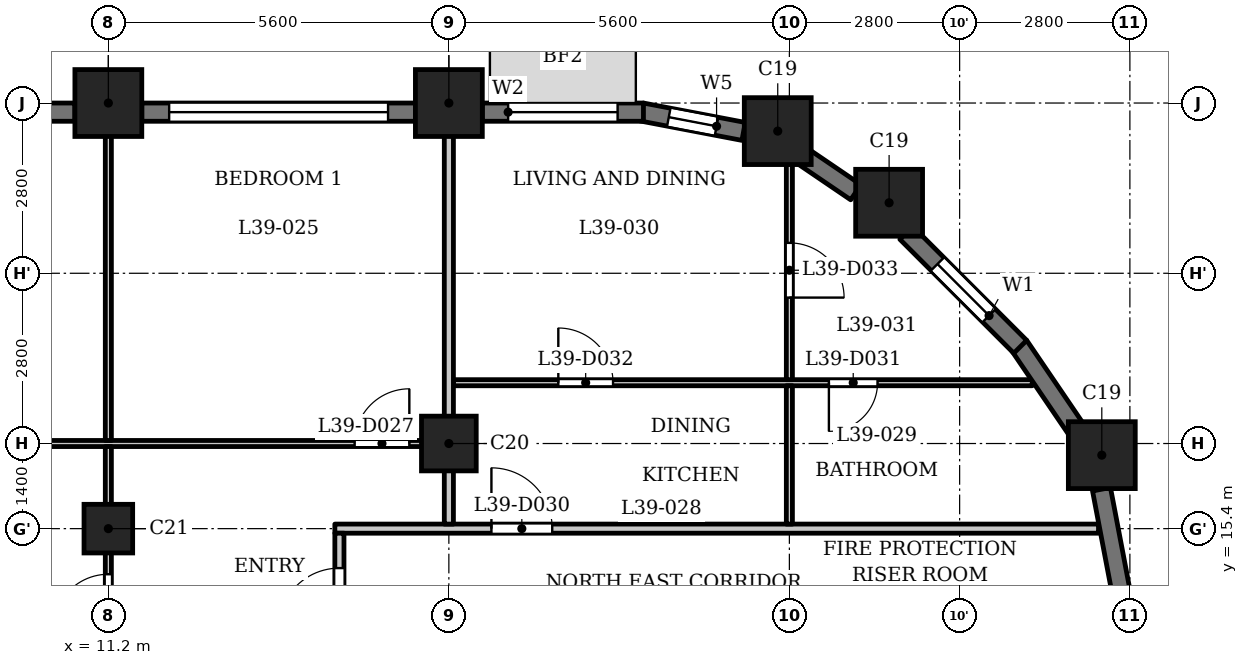
"""IFC4 building model, lengths in metres.
Left out: names, types, materials, properties, quantities, classifications, styles, units other than length and angle.
Written with IfcOpenShell. Run it as: python <this file> out.ifc"""

import sys

from ifc_helpers import new_model, si_unit, direction, frame, frame_2d, origin, origin_2d, place, context, subcontext, project, spatial, rectangle, extrude, element, fill, save


model = new_model("IFC4")
c1 = context("Model", 3, precision=1e-05, world=origin(), true_north=direction((0.0, 1.0)))
c2 = subcontext(c1, "Body", "Model", "MODEL_VIEW")
j1 = project(units=[si_unit("LENGTHUNIT", "METRE"), si_unit("PLANEANGLEUNIT", "RADIAN")], contexts=[c1])
p1 = place(None, origin())
s1 = spatial("IfcSite", under=j1, at=p1, CompositionType="ELEMENT")
p2 = place(p1, origin())
s2 = spatial("IfcBuilding", under=s1, at=p2, CompositionType="ELEMENT")
p3 = place(p2, frame((0.0, 0.0, 153.6)))
s3 = spatial("IfcBuildingStorey", under=s2, at=p3, CompositionType="ELEMENT", Elevation=153.6)
for number, where, z_axis, x_axis in (
    (1, (27.538, 16.609, 0.0), (0.0, 0.0, 1.0), (1.0, 0.0, 0.0)),
    (2, (24.04, 20.76, 0.0), (0.0, 0.0, 1.0), (1.0, 0.0, 0.0)),
    (3, (22.209, 21.938, 0.0), (0.0, 0.0, 1.0), (1.0, 0.0, 0.0)),
    (4, (16.8, 22.4, 0.0), (0.0, 0.0, 1.0), (1.0, 0.0, 0.0)),
    (5, (11.2, 22.4, 0.0), (0.0, 0.0, 1.0), (1.0, 0.0, 0.0)),
):
    element("IfcColumn", number, at=place(p3, frame(where, z_axis=z_axis, x_axis=x_axis)), inside=s3, PredefinedType="COLUMN", context=c2, shape_type="SweptSolid", body=[
        extrude(rectangle(XDim=1.1, YDim=1.1, at=origin_2d()), origin(), (0.0, 0.0, 1.0), 3.5),
    ])
p4 = place(p3, frame((16.8, 16.8, 0.0), z_axis=(0.0, 0.0, 1.0), x_axis=(1.0, 0.0, 0.0)))
e6 = element("IfcColumn", 6, at=p4, inside=s3, PredefinedType="COLUMN", context=c2, shape_type="SweptSolid", body=[
    extrude(rectangle(XDim=0.9, YDim=0.9, at=origin_2d()), origin(), (0.0, 0.0, 1.0), 3.5),
])
p5 = place(p3, frame((11.2, 15.4, 0.0), z_axis=(0.0, 0.0, 1.0), x_axis=(1.0, 0.0, 0.0)))
e7 = element("IfcColumn", 7, at=p5, inside=s3, PredefinedType="COLUMN", context=c2, shape_type="SweptSolid", body=[
    extrude(rectangle(XDim=0.8, YDim=0.8, at=origin_2d()), origin(), (0.0, 0.0, 1.0), 3.5),
])
p6 = place(p3, frame((27.853, 14.372, 0.0), z_axis=(0.0, 0.0, 1.0), x_axis=(-0.187302784601, 0.982302227871, 0.0)))
e8 = element("IfcWall", 8, at=p6, inside=s3, PredefinedType="SOLIDWALL", context=c2, shape_type="SweptSolid", body=[
    extrude(rectangle(XDim=1.706, YDim=0.3, at=frame_2d((0.853, 0.0))), origin(), (0.0, 0.0, 1.0), 2.45),
])
p7 = place(p3, frame((27.138, 17.002, 0.0), z_axis=(0.0, 0.0, 1.0), x_axis=(-0.562075160946, 0.827086158419, 0.0)))
e9 = element("IfcWall", 9, at=p7, inside=s3, PredefinedType="SOLIDWALL", context=c2, shape_type="SweptSolid", body=[
    extrude(rectangle(XDim=1.706, YDim=0.3, at=frame_2d((0.853, 0.0))), origin(), (0.0, 0.0, 1.0), 2.45),
])
p8 = place(p3, frame((26.197, 18.391, 0.0), z_axis=(0.0, 0.0, 1.0), x_axis=(-0.707060717099, 0.707152842274, 0.0)))
e10 = element("IfcWall", 10, at=p8, inside=s3, PredefinedType="SOLIDWALL", context=c2, shape_type="SweptSolid", body=[
    extrude(rectangle(XDim=2.65, YDim=0.3, at=frame_2d((1.325, 0.0))), origin(), (0.0, 0.0, 1.0), 2.45),
])
p9 = place(p8, frame((0.725, 0.0, 0.6)))
e11 = element("IfcOpeningElement", 11, at=p9, cuts=e10, PredefinedType="OPENING", context=c2, shape_type="SweptSolid", body=[
    extrude(rectangle(XDim=1.2, YDim=1.55, at=frame_2d((0.6, 0.775))), frame((0.0, 0.16, 0.0), z_axis=(0.0, -1.0, 0.0), x_axis=(1.0, 0.0, 0.0)), (0.0, 0.0, 1.0), 0.32),
])
p10 = place(p3, frame((23.492, 20.932, 0.0), z_axis=(0.0, 0.0, 1.0), x_axis=(-0.826993959827, 0.562210806023, 0.0)))
e12 = element("IfcWall", 12, at=p10, inside=s3, PredefinedType="SOLIDWALL", context=c2, shape_type="SweptSolid", body=[
    extrude(rectangle(XDim=1.077, YDim=0.3, at=frame_2d((0.539, 0.0))), origin(), (0.0, 0.0, 1.0), 3.2),
])
p11 = place(p3, frame((21.648, 21.933, 0.0), z_axis=(0.0, 0.0, 1.0), x_axis=(-0.982297206936, 0.187329114784, 0.0)))
e13 = element("IfcWall", 13, at=p11, inside=s3, PredefinedType="SOLIDWALL", context=c2, shape_type="SweptSolid", body=[
    extrude(rectangle(XDim=1.706, YDim=0.3, at=frame_2d((0.853, 0.0))), origin(), (0.0, 0.0, 1.0), 2.45),
])
p12 = place(p11, frame((0.453, 0.0, 0.6)))
e14 = element("IfcOpeningElement", 14, at=p12, cuts=e13, PredefinedType="OPENING", context=c2, shape_type="SweptSolid", body=[
    extrude(rectangle(XDim=0.8, YDim=1.55, at=frame_2d((0.4, 0.775))), frame((0.0, 0.16, 0.0), z_axis=(0.0, -1.0, 0.0), x_axis=(1.0, 0.0, 0.0)), (0.0, 0.0, 1.0), 0.32),
])
p13 = place(p3, frame((20.0, 22.25, 0.0), z_axis=(0.0, 0.0, 1.0), x_axis=(-1.0, 0.0, 0.0)))
e15 = element("IfcWall", 15, at=p13, inside=s3, PredefinedType="SOLIDWALL", context=c2, shape_type="SweptSolid", body=[
    extrude(rectangle(XDim=2.65, YDim=0.3, at=frame_2d((1.325, 0.0))), origin(), (0.0, 0.0, 1.0), 2.45),
])
p14 = place(p13, frame((0.425, 0.0, 0.9)))
e16 = element("IfcOpeningElement", 16, at=p14, cuts=e15, PredefinedType="OPENING", context=c2, shape_type="SweptSolid", body=[
    extrude(rectangle(XDim=1.8, YDim=1.25, at=frame_2d((0.9, 0.625))), frame((0.0, 0.16, 0.0), z_axis=(0.0, -1.0, 0.0), x_axis=(1.0, 0.0, 0.0)), (0.0, 0.0, 1.0), 0.32),
])
p15 = place(p3, frame((16.25, 22.25, 0.0), z_axis=(0.0, 0.0, 1.0), x_axis=(-1.0, 0.0, 0.0)))
e17 = element("IfcWall", 17, at=p15, inside=s3, PredefinedType="SOLIDWALL", context=c2, shape_type="SweptSolid", body=[
    extrude(rectangle(XDim=4.5, YDim=0.3, at=frame_2d((2.25, 0.0))), origin(), (0.0, 0.0, 1.0), 2.45),
])
p16 = place(p15, frame((0.45, 0.0, 1.2)))
e18 = element("IfcOpeningElement", 18, at=p16, cuts=e17, PredefinedType="OPENING", context=c2, shape_type="SweptSolid", body=[
    extrude(rectangle(XDim=3.6, YDim=0.95, at=frame_2d((1.8, 0.475))), frame((0.0, 0.16, 0.0), z_axis=(0.0, -1.0, 0.0), x_axis=(1.0, 0.0, 0.0)), (0.0, 0.0, 1.0), 0.32),
])
p17 = place(p3, frame((10.65, 22.25, 0.0), z_axis=(0.0, 0.0, 1.0), x_axis=(-1.0, 0.0, 0.0)))
e19 = element("IfcWall", 19, at=p17, inside=s3, PredefinedType="SOLIDWALL", context=c2, shape_type="SweptSolid", body=[
    extrude(rectangle(XDim=4.5, YDim=0.3, at=frame_2d((2.25, 0.0))), origin(), (0.0, 0.0, 1.0), 2.45),
])
p18 = place(p17, frame((0.45, 0.0, 1.2)))
e20 = element("IfcOpeningElement", 20, at=p18, cuts=e19, PredefinedType="OPENING", context=c2, shape_type="SweptSolid", body=[
    extrude(rectangle(XDim=3.6, YDim=0.95, at=frame_2d((1.8, 0.475))), frame((0.0, 0.16, 0.0), z_axis=(0.0, -1.0, 0.0), x_axis=(1.0, 0.0, 0.0)), (0.0, 0.0, 1.0), 0.32),
])
p19 = place(p3, frame((14.925, 15.4, 0.0), z_axis=(0.0, 0.0, 1.0), x_axis=(1.0, 0.0, 0.0)))
e21 = element("IfcWall", 21, at=p19, inside=s3, PredefinedType="PARTITIONING", context=c2, shape_type="SweptSolid", body=[
    extrude(rectangle(XDim=12.559, YDim=0.15, at=frame_2d((6.279, 0.0))), origin(), (0.0, 0.0, 1.0), 3.2),
])
p20 = place(p19, frame((2.575, 0.0, 0.0)))
e22 = element("IfcOpeningElement", 22, at=p20, cuts=e21, PredefinedType="OPENING", context=c2, shape_type="SweptSolid", body=[
    extrude(rectangle(XDim=1.0, YDim=2.1, at=frame_2d((0.5, 1.05))), frame((0.0, 0.085, 0.0), z_axis=(0.0, -1.0, 0.0), x_axis=(1.0, 0.0, 0.0)), (0.0, 0.0, 1.0), 0.17),
])
p21 = place(p3, frame((-16.725, 16.8, 0.0), z_axis=(0.0, 0.0, 1.0), x_axis=(1.0, 0.0, 0.0)))
e23 = element("IfcWall", 23, at=p21, inside=s3, PredefinedType="PARTITIONING", context=c2, shape_type="SweptSolid", body=[
    extrude(rectangle(XDim=33.45, YDim=0.1, at=frame_2d((16.725, 0.0))), origin(), (0.0, 0.0, 1.0), 3.2),
])
p22 = place(p21, frame((9.575, 0.0, 0.0)))
e24 = element("IfcOpeningElement", 24, at=p22, cuts=e23, PredefinedType="OPENING", context=c2, shape_type="SweptSolid", body=[
    extrude(rectangle(XDim=0.8, YDim=2.1, at=frame_2d((0.4, 1.05))), frame((0.0, 0.06, 0.0), z_axis=(0.0, -1.0, 0.0), x_axis=(1.0, 0.0, 0.0)), (0.0, 0.0, 1.0), 0.12),
])
p23 = place(p21, frame((6.125, 0.0, 0.0)))
e25 = element("IfcOpeningElement", 25, at=p23, cuts=e23, PredefinedType="OPENING", context=c2, shape_type="SweptSolid", body=[
    extrude(rectangle(XDim=0.9, YDim=2.1, at=frame_2d((0.45, 1.05))), frame((0.0, 0.06, 0.0), z_axis=(0.0, -1.0, 0.0), x_axis=(1.0, 0.0, 0.0)), (0.0, 0.0, 1.0), 0.12),
])
p24 = place(p21, frame((0.975, 0.0, 0.0)))
e26 = element("IfcOpeningElement", 26, at=p24, cuts=e23, PredefinedType="OPENING", context=c2, shape_type="SweptSolid", body=[
    extrude(rectangle(XDim=0.9, YDim=2.1, at=frame_2d((0.45, 1.05))), frame((0.0, 0.06, 0.0), z_axis=(0.0, -1.0, 0.0), x_axis=(1.0, 0.0, 0.0)), (0.0, 0.0, 1.0), 0.12),
])
p25 = place(p21, frame((3.225, 0.0, 0.0)))
e27 = element("IfcOpeningElement", 27, at=p25, cuts=e23, PredefinedType="OPENING", context=c2, shape_type="SweptSolid", body=[
    extrude(rectangle(XDim=0.9, YDim=2.1, at=frame_2d((0.45, 1.05))), frame((0.0, 0.06, 0.0), z_axis=(0.0, -1.0, 0.0), x_axis=(1.0, 0.0, 0.0)), (0.0, 0.0, 1.0), 0.12),
])
p26 = place(p21, frame((15.375, 0.0, 0.0)))
e28 = element("IfcOpeningElement", 28, at=p26, cuts=e23, PredefinedType="OPENING", context=c2, shape_type="SweptSolid", body=[
    extrude(rectangle(XDim=0.8, YDim=2.1, at=frame_2d((0.4, 1.05))), frame((0.0, 0.06, 0.0), z_axis=(0.0, -1.0, 0.0), x_axis=(1.0, 0.0, 0.0)), (0.0, 0.0, 1.0), 0.12),
])
p27 = place(p21, frame((13.175, 0.0, 0.0)))
e29 = element("IfcOpeningElement", 29, at=p27, cuts=e23, PredefinedType="OPENING", context=c2, shape_type="SweptSolid", body=[
    extrude(rectangle(XDim=0.9, YDim=2.1, at=frame_2d((0.45, 1.05))), frame((0.0, 0.06, 0.0), z_axis=(0.0, -1.0, 0.0), x_axis=(1.0, 0.0, 0.0)), (0.0, 0.0, 1.0), 0.12),
])
p28 = place(p21, frame((31.975, 0.0, 0.0)))
e30 = element("IfcOpeningElement", 30, at=p28, cuts=e23, PredefinedType="OPENING", context=c2, shape_type="SweptSolid", body=[
    extrude(rectangle(XDim=0.9, YDim=2.1, at=frame_2d((0.45, 1.05))), frame((0.0, 0.06, 0.0), z_axis=(0.0, -1.0, 0.0), x_axis=(1.0, 0.0, 0.0)), (0.0, 0.0, 1.0), 0.12),
])
p29 = place(p21, frame((22.875, 0.0, 0.0)))
e31 = element("IfcOpeningElement", 31, at=p29, cuts=e23, PredefinedType="OPENING", context=c2, shape_type="SweptSolid", body=[
    extrude(rectangle(XDim=0.9, YDim=2.1, at=frame_2d((0.45, 1.05))), frame((0.0, 0.06, 0.0), z_axis=(0.0, -1.0, 0.0), x_axis=(1.0, 0.0, 0.0)), (0.0, 0.0, 1.0), 0.12),
])
p30 = place(p3, frame((16.875, 17.8, 0.0), z_axis=(0.0, 0.0, 1.0), x_axis=(1.0, 0.0, 0.0)))
e32 = element("IfcWall", 32, at=p30, inside=s3, PredefinedType="PARTITIONING", context=c2, shape_type="SweptSolid", body=[
    extrude(rectangle(XDim=9.519, YDim=0.1, at=frame_2d((4.76, 0.0))), origin(), (0.0, 0.0, 1.0), 3.2),
])
p31 = place(p30, frame((6.175, 0.0, 0.0)))
e33 = element("IfcOpeningElement", 33, at=p31, cuts=e32, PredefinedType="OPENING", context=c2, shape_type="SweptSolid", body=[
    extrude(rectangle(XDim=0.8, YDim=2.1, at=frame_2d((0.4, 1.05))), frame((0.0, 0.06, 0.0), z_axis=(0.0, -1.0, 0.0), x_axis=(1.0, 0.0, 0.0)), (0.0, 0.0, 1.0), 0.12),
])
p32 = place(p30, frame((1.725, 0.0, 0.0)))
e34 = element("IfcOpeningElement", 34, at=p32, cuts=e32, PredefinedType="OPENING", context=c2, shape_type="SweptSolid", body=[
    extrude(rectangle(XDim=0.9, YDim=2.1, at=frame_2d((0.45, 1.05))), frame((0.0, 0.06, 0.0), z_axis=(0.0, -1.0, 0.0), x_axis=(1.0, 0.0, 0.0)), (0.0, 0.0, 1.0), 0.12),
])
p33 = place(p3, frame((11.2, 13.275, 0.0), z_axis=(0.0, 0.0, 1.0), x_axis=(0.0, 1.0, 0.0)))
e35 = element("IfcWall", 35, at=p33, inside=s3, PredefinedType="PARTITIONING", context=c2, shape_type="SweptSolid", body=[
    extrude(rectangle(XDim=3.475, YDim=0.1, at=frame_2d((1.738, 0.0))), origin(), (0.0, 0.0, 1.0), 3.2),
])
p34 = place(p33, frame((0.475, 0.0, 0.0)))
e36 = element("IfcOpeningElement", 36, at=p34, cuts=e35, PredefinedType="OPENING", context=c2, shape_type="SweptSolid", body=[
    extrude(rectangle(XDim=0.9, YDim=2.1, at=frame_2d((0.45, 1.05))), frame((0.0, 0.06, 0.0), z_axis=(0.0, -1.0, 0.0), x_axis=(1.0, 0.0, 0.0)), (0.0, 0.0, 1.0), 0.12),
])
p35 = place(p3, frame((11.2, 16.85, 0.0), z_axis=(0.0, 0.0, 1.0), x_axis=(0.0, 1.0, 0.0)))
e37 = element("IfcWall", 37, at=p35, inside=s3, PredefinedType="PARTITIONING", context=c2, shape_type="SweptSolid", body=[
    extrude(rectangle(XDim=6.08, YDim=0.1, at=frame_2d((3.04, 0.0))), origin(), (0.0, 0.0, 1.0), 3.2),
])
p36 = place(p3, frame((15.0, 13.275, 0.0), z_axis=(0.0, 0.0, 1.0), x_axis=(0.0, 1.0, 0.0)))
e38 = element("IfcWall", 38, at=p36, inside=s3, PredefinedType="PARTITIONING", context=c2, shape_type="SweptSolid", body=[
    extrude(rectangle(XDim=2.05, YDim=0.15, at=frame_2d((1.025, 0.0))), origin(), (0.0, 0.0, 1.0), 3.2),
])
p37 = place(p36, frame((0.476, 0.0, 0.0)))
e39 = element("IfcOpeningElement", 39, at=p37, cuts=e38, PredefinedType="OPENING", context=c2, shape_type="SweptSolid", body=[
    extrude(rectangle(XDim=1.0, YDim=2.1, at=frame_2d((0.5, 1.05))), frame((0.0, 0.085, 0.0), z_axis=(0.0, -1.0, 0.0), x_axis=(1.0, 0.0, 0.0)), (0.0, 0.0, 1.0), 0.17),
])
p38 = place(p3, frame((16.8, 15.475, 0.0), z_axis=(0.0, 0.0, 1.0), x_axis=(0.0, 1.0, 0.0)))
e40 = element("IfcWall", 40, at=p38, inside=s3, PredefinedType="PARTITIONING", context=c2, shape_type="SweptSolid", body=[
    extrude(rectangle(XDim=7.455, YDim=0.15, at=frame_2d((3.728, 0.0))), origin(), (0.0, 0.0, 1.0), 3.2),
])
p39 = place(p3, frame((22.4, 15.475, 0.0), z_axis=(0.0, 0.0, 1.0), x_axis=(0.0, 1.0, 0.0)))
e41 = element("IfcWall", 41, at=p39, inside=s3, PredefinedType="PARTITIONING", context=c2, shape_type="SweptSolid", body=[
    extrude(rectangle(XDim=2.275, YDim=0.1, at=frame_2d((1.137, 0.0))), origin(), (0.0, 0.0, 1.0), 3.2),
])
p40 = place(p3, frame((22.4, 17.85, 0.0), z_axis=(0.0, 0.0, 1.0), x_axis=(0.0, 1.0, 0.0)))
e42 = element("IfcWall", 42, at=p40, inside=s3, PredefinedType="PARTITIONING", context=c2, shape_type="SweptSolid", body=[
    extrude(rectangle(XDim=3.87, YDim=0.1, at=frame_2d((1.935, 0.0))), origin(), (0.0, 0.0, 1.0), 3.2),
])
p41 = place(p40, frame((1.35, 0.0, 0.0)))
e43 = element("IfcOpeningElement", 43, at=p41, cuts=e42, PredefinedType="OPENING", context=c2, shape_type="SweptSolid", body=[
    extrude(rectangle(XDim=0.9, YDim=2.1, at=frame_2d((0.45, 1.05))), frame((0.0, 0.06, 0.0), z_axis=(0.0, -1.0, 0.0), x_axis=(1.0, 0.0, 0.0)), (0.0, 0.0, 1.0), 0.12),
])
p42 = place(p37, origin())
e44 = element("IfcDoor", 44, at=p42, inside=s3, OperationType="SINGLE_SWING_RIGHT", PredefinedType="DOOR", context=c2, shape_type="SweptSolid", body=[
    extrude(rectangle(XDim=1.0, YDim=2.1, at=frame_2d((0.5, 1.05))), frame((0.0, 0.025, 0.0), z_axis=(0.0, -1.0, 0.0), x_axis=(1.0, 0.0, 0.0)), (0.0, 0.0, 1.0), 0.05),
])
fill(e39, e44)
p43 = place(p34, origin())
e45 = element("IfcDoor", 45, at=p43, inside=s3, OperationType="SINGLE_SWING_RIGHT", PredefinedType="DOOR", context=c2, shape_type="SweptSolid", body=[
    extrude(rectangle(XDim=0.9, YDim=2.1, at=frame_2d((0.45, 1.05))), frame((0.0, 0.025, 0.0), z_axis=(0.0, -1.0, 0.0), x_axis=(1.0, 0.0, 0.0)), (0.0, 0.0, 1.0), 0.05),
])
fill(e36, e45)
p44 = place(p28, origin())
e46 = element("IfcDoor", 46, at=p44, inside=s3, OperationType="SINGLE_SWING_LEFT", PredefinedType="DOOR", context=c2, shape_type="SweptSolid", body=[
    extrude(rectangle(XDim=0.9, YDim=2.1, at=frame_2d((0.45, 1.05))), frame((0.0, 0.025, 0.0), z_axis=(0.0, -1.0, 0.0), x_axis=(1.0, 0.0, 0.0)), (0.0, 0.0, 1.0), 0.05),
])
fill(e30, e46)
p45 = place(p20, origin())
e47 = element("IfcDoor", 47, at=p45, inside=s3, OperationType="SINGLE_SWING_RIGHT", PredefinedType="DOOR", context=c2, shape_type="SweptSolid", body=[
    extrude(rectangle(XDim=1.0, YDim=2.1, at=frame_2d((0.5, 1.05))), frame((0.0, 0.025, 0.0), z_axis=(0.0, -1.0, 0.0), x_axis=(1.0, 0.0, 0.0)), (0.0, 0.0, 1.0), 0.05),
])
fill(e22, e47)
p46 = place(p31, origin())
e48 = element("IfcDoor", 48, at=p46, inside=s3, OperationType="SINGLE_SWING_LEFT", PredefinedType="DOOR", context=c2, shape_type="SweptSolid", body=[
    extrude(rectangle(XDim=0.8, YDim=2.1, at=frame_2d((0.4, 1.05))), frame((0.0, 0.025, 0.0), z_axis=(0.0, -1.0, 0.0), x_axis=(1.0, 0.0, 0.0)), (0.0, 0.0, 1.0), 0.05),
])
fill(e33, e48)
p47 = place(p32, origin())
e49 = element("IfcDoor", 49, at=p47, inside=s3, OperationType="SINGLE_SWING_RIGHT", PredefinedType="DOOR", context=c2, shape_type="SweptSolid", body=[
    extrude(rectangle(XDim=0.9, YDim=2.1, at=frame_2d((0.45, 1.05))), frame((0.0, 0.025, 0.0), z_axis=(0.0, -1.0, 0.0), x_axis=(1.0, 0.0, 0.0)), (0.0, 0.0, 1.0), 0.05),
])
fill(e34, e49)
p48 = place(p41, origin())
e50 = element("IfcDoor", 50, at=p48, inside=s3, OperationType="SINGLE_SWING_LEFT", PredefinedType="DOOR", context=c2, shape_type="SweptSolid", body=[
    extrude(rectangle(XDim=0.9, YDim=2.1, at=frame_2d((0.45, 1.05))), frame((0.0, 0.025, 0.0), z_axis=(0.0, -1.0, 0.0), x_axis=(1.0, 0.0, 0.0)), (0.0, 0.0, 1.0), 0.05),
])
fill(e43, e50)
p49 = place(p9, origin())
e51 = element("IfcWindow", 51, at=p49, inside=s3, PartitioningType="SINGLE_PANEL", PredefinedType="WINDOW", context=c2, shape_type="SweptSolid", body=[
    extrude(rectangle(XDim=1.2, YDim=1.55, at=frame_2d((0.6, 0.775))), frame((0.0, 0.03, 0.0), z_axis=(0.0, -1.0, 0.0), x_axis=(1.0, 0.0, 0.0)), (0.0, 0.0, 1.0), 0.06),
])
fill(e11, e51)
p50 = place(p12, origin())
e52 = element("IfcWindow", 52, at=p50, inside=s3, PartitioningType="SINGLE_PANEL", PredefinedType="WINDOW", context=c2, shape_type="SweptSolid", body=[
    extrude(rectangle(XDim=0.8, YDim=1.55, at=frame_2d((0.4, 0.775))), frame((0.0, 0.03, 0.0), z_axis=(0.0, -1.0, 0.0), x_axis=(1.0, 0.0, 0.0)), (0.0, 0.0, 1.0), 0.06),
])
fill(e14, e52)
p51 = place(p14, origin())
e53 = element("IfcWindow", 53, at=p51, inside=s3, PartitioningType="SINGLE_PANEL", PredefinedType="WINDOW", context=c2, shape_type="SweptSolid", body=[
    extrude(rectangle(XDim=1.8, YDim=1.25, at=frame_2d((0.9, 0.625))), frame((0.0, 0.03, 0.0), z_axis=(0.0, -1.0, 0.0), x_axis=(1.0, 0.0, 0.0)), (0.0, 0.0, 1.0), 0.06),
])
fill(e16, e53)
p52 = place(p16, origin())
e54 = element("IfcWindow", 54, at=p52, inside=s3, PartitioningType="SINGLE_PANEL", PredefinedType="WINDOW", context=c2, shape_type="SweptSolid", body=[
    extrude(rectangle(XDim=3.6, YDim=0.95, at=frame_2d((1.8, 0.475))), frame((0.0, 0.03, 0.0), z_axis=(0.0, -1.0, 0.0), x_axis=(1.0, 0.0, 0.0)), (0.0, 0.0, 1.0), 0.06),
])
fill(e18, e54)
save(model, sys.argv[1])
